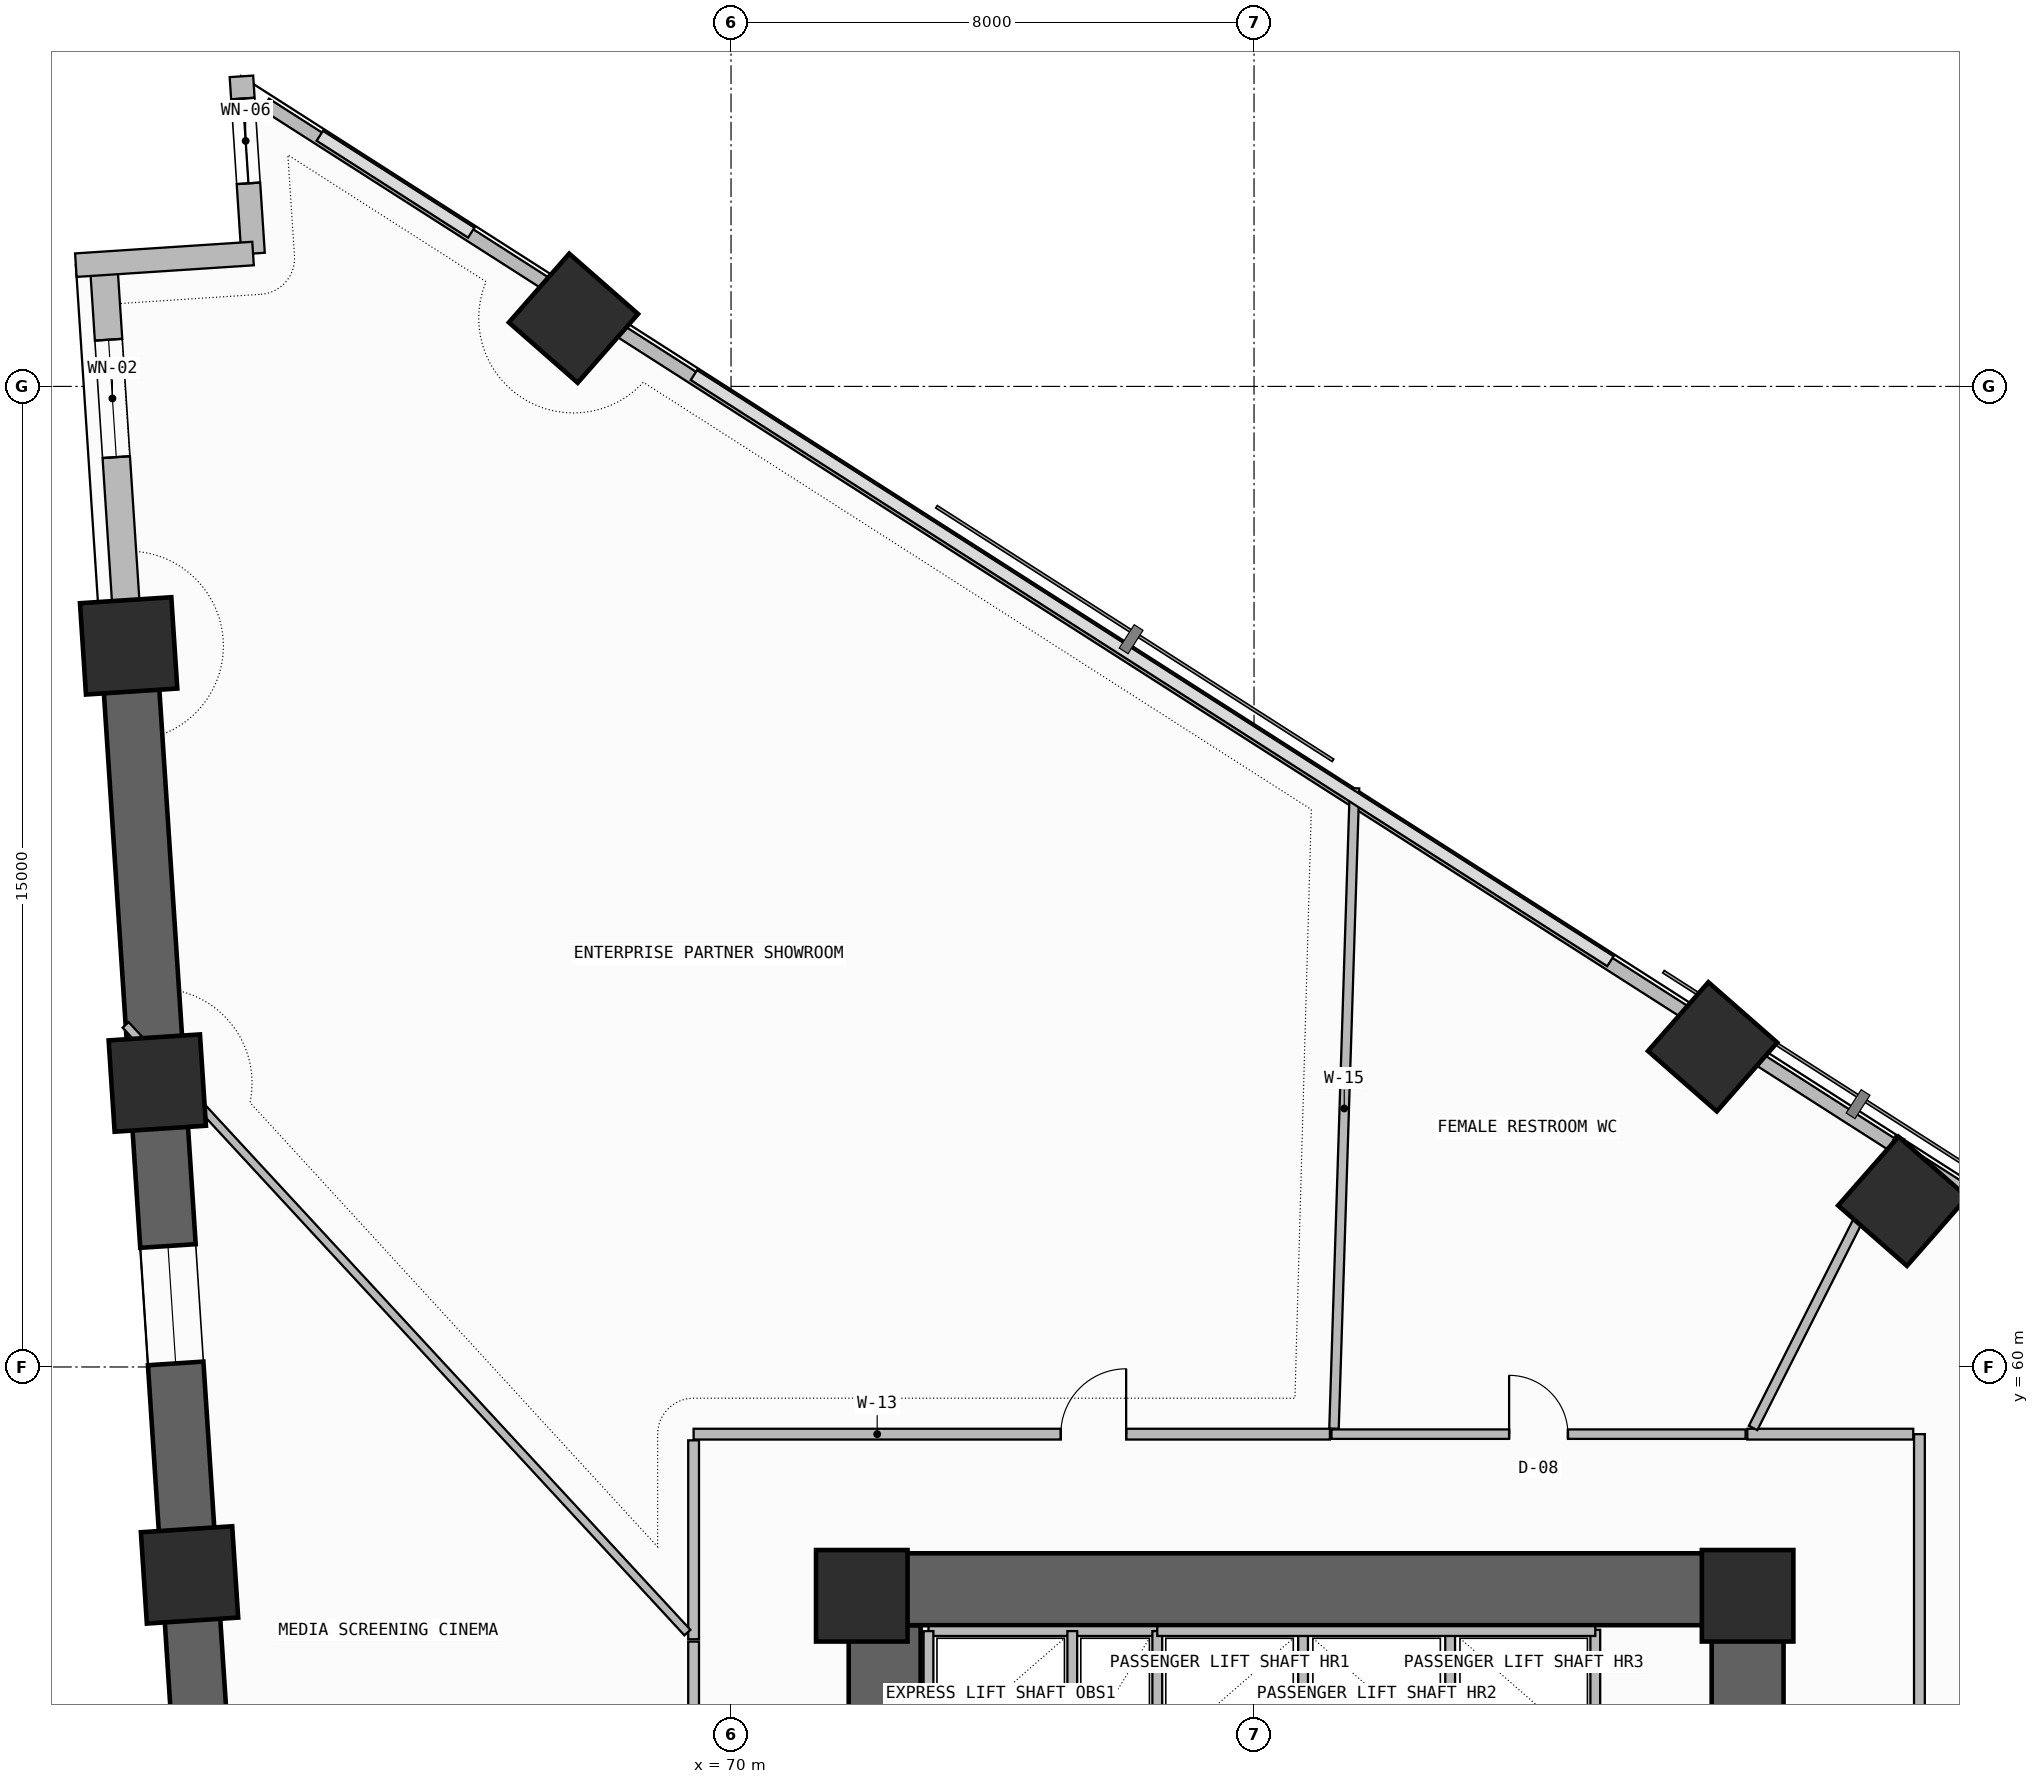
"""IFC4 building model, lengths in metres.
Left out: names, types, materials, properties, quantities, classifications, styles, units other than length and angle.
Written with IfcOpenShell. Run it as: python <this file> out.ifc"""

import sys

from ifc_helpers import new_model, si_unit, direction, frame, frame_2d, origin, origin_2d, place, context, subcontext, project, spatial, rectangle, extrude, element, fill, save


model = new_model("IFC4")
c1 = context("Model", 3, precision=1e-05, world=origin(), true_north=direction((0.0, 1.0)))
c2 = subcontext(c1, "Body", "Model", "MODEL_VIEW")
j1 = project(units=[si_unit("LENGTHUNIT", "METRE"), si_unit("PLANEANGLEUNIT", "RADIAN")], contexts=[c1])
p1 = place(None, origin())
s1 = spatial("IfcSite", under=j1, at=p1, CompositionType="ELEMENT")
p2 = place(p1, origin())
s2 = spatial("IfcBuilding", under=s1, at=p2, CompositionType="ELEMENT")
p3 = place(p2, frame((0.0, 0.0, 84.9)))
s3 = spatial("IfcBuildingStorey", under=s2, at=p3, CompositionType="ELEMENT", Elevation=84.9)
p4 = place(p3, frame((72.35, 43.35, -0.26), z_axis=(0.0, 0.0, 1.0), x_axis=(0.0, 1.0, 0.0)))
e1 = element("IfcWall", 1, at=p4, inside=s3, PredefinedType="SHEAR", context=c2, shape_type="SweptSolid", body=[
    extrude(rectangle(XDim=12.7, YDim=1.1, at=frame_2d((6.35, 0.0))), origin(), (0.0, 0.0, 1.0), 3.6),
])
p5 = place(p4, frame((1.35, 0.0, 0.26)))
e2 = element("IfcOpeningElement", 2, at=p5, cuts=e1, PredefinedType="OPENING", context=c2, shape_type="SweptSolid", body=[
    extrude(rectangle(XDim=1.2, YDim=2.2, at=frame_2d((0.6, 1.1))), frame((0.0, 0.56, 0.0), z_axis=(0.0, -1.0, 0.0), x_axis=(1.0, 0.0, 0.0)), (0.0, 0.0, 1.0), 1.12),
])
p6 = place(p3, frame((71.8, 56.6, -0.26), z_axis=(0.0, 0.0, 1.0), x_axis=(1.0, 0.0, 0.0)))
e3 = element("IfcWall", 3, at=p6, inside=s3, PredefinedType="SHEAR", context=c2, shape_type="SweptSolid", body=[
    extrude(rectangle(XDim=14.3, YDim=1.1, at=frame_2d((7.15, 0.0))), origin(), (0.0, 0.0, 1.0), 3.6),
])
p7 = place(p3, frame((85.55, 47.6, -0.26), z_axis=(0.0, 0.0, 1.0), x_axis=(0.0, 1.0, 0.0)))
e4 = element("IfcWall", 4, at=p7, inside=s3, PredefinedType="SHEAR", context=c2, shape_type="SweptSolid", body=[
    extrude(rectangle(XDim=8.45, YDim=1.1, at=frame_2d((4.225, 0.0))), origin(), (0.0, 0.0, 1.0), 3.6),
])
for number, where, z_axis, x_axis in (
    (5, (72.0, 56.5, 0.0), (0.0, 0.0, 1.0), (1.0, 0.0, 0.0)),
    (6, (85.55, 56.5, 0.0), (0.0, 0.0, 1.0), (1.0, 0.0, 0.0)),
    (7, (87.923, 62.534, 0.0), (0.0, 0.0, 1.0), (0.659, 0.752, 0.0)),
    (8, (85.015, 64.898, 0.0), (0.0, 0.0, 1.0), (0.659, 0.752, 0.0)),
    (9, (67.59, 76.043, 0.0), (0.0, 0.0, 1.0), (0.659, 0.752, 0.0)),
    (10, (60.785, 71.031, 0.0), (0.0, 0.0, 1.0), (-0.065, 0.998, 0.0)),
    (11, (61.224, 64.343, 0.0), (0.0, 0.0, 1.0), (-0.065, 0.998, 0.0)),
    (12, (61.717, 56.819, 0.0), (0.0, 0.0, 1.0), (-0.065, 0.998, 0.0)),
):
    element("IfcColumn", number, at=place(p3, frame(where, z_axis=z_axis, x_axis=x_axis)), inside=s3, PredefinedType="COLUMN", context=c2, shape_type="SweptSolid", body=[
        extrude(rectangle(XDim=1.4, YDim=1.4, at=origin_2d()), origin(), (0.0, 0.0, 1.0), 3.6),
    ])
p8 = place(p3, frame((60.402, 76.883, 0.0), z_axis=(0.0, 0.0, 1.0), x_axis=(0.065402662459, -0.997858953832, 0.0)))
e13 = element("IfcWall", 13, at=p8, inside=s3, PredefinedType="SOLIDWALL", context=c2, shape_type="SweptSolid", body=[
    extrude(rectangle(XDim=5.864, YDim=0.42, at=frame_2d((2.932, 0.0))), origin(), (0.0, 0.0, 1.0), 2.725),
])
p9 = place(p8, frame((1.171, 0.0, 1.2)))
e14 = element("IfcOpeningElement", 14, at=p9, cuts=e13, PredefinedType="OPENING", context=c2, shape_type="SweptSolid", body=[
    extrude(rectangle(XDim=1.8, YDim=0.9, at=frame_2d((0.9, 0.45))), frame((0.0, 0.22, 0.0), z_axis=(0.0, -1.0, 0.0), x_axis=(1.0, 0.0, 0.0)), (0.0, 0.0, 1.0), 0.44),
])
p10 = place(p3, frame((60.785, 71.031, -0.26), z_axis=(0.0, 0.0, 1.0), x_axis=(0.065409824833, -0.997858484363, 0.0)))
e15 = element("IfcWall", 15, at=p10, inside=s3, PredefinedType="SHEAR", context=c2, shape_type="SweptSolid", body=[
    extrude(rectangle(XDim=21.783, YDim=0.85, at=frame_2d((10.891, 0.0))), origin(), (0.0, 0.0, 1.0), 3.6),
])
p11 = place(p10, frame((9.2, 0.0, 1.2)))
e16 = element("IfcOpeningElement", 16, at=p11, cuts=e15, PredefinedType="OPENING", context=c2, shape_type="SweptSolid", body=[
    extrude(rectangle(XDim=1.8, YDim=0.9, at=frame_2d((0.9, 0.45))), frame((0.0, 0.435, 0.0), z_axis=(0.0, -1.0, 0.0), x_axis=(1.0, 0.0, 0.0)), (0.0, 0.0, 1.0), 0.87),
])
p12 = place(p3, frame((62.511, 79.743, 0.0), z_axis=(0.0, 0.0, 1.0), x_axis=(0.065337885661, -0.997863197386, 0.0)))
e17 = element("IfcWall", 17, at=p12, inside=s3, PredefinedType="SOLIDWALL", context=c2, shape_type="SweptSolid", body=[
    extrude(rectangle(XDim=2.717, YDim=0.36, at=frame_2d((1.358, 0.0))), origin(), (0.0, 0.0, 1.0), 3.34),
])
p13 = place(p12, frame((0.34, 0.0, 0.45)))
e18 = element("IfcOpeningElement", 18, at=p13, cuts=e17, PredefinedType="OPENING", context=c2, shape_type="SweptSolid", body=[
    extrude(rectangle(XDim=1.3, YDim=2.4, at=frame_2d((0.65, 1.2))), frame((0.0, 0.19, 0.0), z_axis=(0.0, -1.0, 0.0), x_axis=(1.0, 0.0, 0.0)), (0.0, 0.0, 1.0), 0.38),
])
p14 = place(p3, frame((62.688, 77.033, 0.0), z_axis=(0.0, 0.0, 1.0), x_axis=(-0.99785694905, -0.065433242561, 0.0)))
e19 = element("IfcWall", 19, at=p14, inside=s3, PredefinedType="SOLIDWALL", context=c2, shape_type="SweptSolid", body=[
    extrude(rectangle(XDim=2.716, YDim=0.36, at=frame_2d((1.358, 0.0))), origin(), (0.0, 0.0, 1.0), 3.34),
])
p15 = place(p3, frame((93.176, 59.939, 0.0), z_axis=(0.0, 0.0, 1.0), x_axis=(-0.842413081081, 0.538832256666, 0.0)))
e20 = element("IfcWall", 20, at=p15, inside=s3, PredefinedType="PARAPET", context=c2, shape_type="SweptSolid", body=[
    extrude(rectangle(XDim=9.011, YDim=0.2, at=frame_2d((4.505, 0.0))), origin(), (0.0, 0.0, 1.0), 1.15),
])
p16 = place(p3, frame((84.682, 65.372, 0.0), z_axis=(0.0, 0.0, 1.0), x_axis=(-0.842418773655, 0.538823356763, 0.0)))
e21 = element("IfcWall", 21, at=p16, inside=s3, PredefinedType="PARAPET", context=c2, shape_type="SweptSolid", body=[
    extrude(rectangle(XDim=19.612, YDim=0.2, at=frame_2d((9.806, 0.0))), origin(), (0.0, 0.0, 1.0), 1.15),
])
p17 = place(p3, frame((67.257, 76.518, 0.0), z_axis=(0.0, 0.0, 1.0), x_axis=(-0.842403631411, 0.538847030042, 0.0)))
e22 = element("IfcWall", 22, at=p17, inside=s3, PredefinedType="PARAPET", context=c2, shape_type="SweptSolid", body=[
    extrude(rectangle(XDim=5.196, YDim=0.2, at=frame_2d((2.598, 0.0))), origin(), (0.0, 0.0, 1.0), 1.15),
])
p18 = place(p3, frame((73.02, 55.96, 0.0), z_axis=(0.0, 0.0, 1.0), x_axis=(1.0, 0.0, 0.0)))
e23 = element("IfcWall", 23, at=p18, inside=s3, PredefinedType="SOLIDWALL", context=c2, shape_type="SweptSolid", body=[
    extrude(rectangle(XDim=3.5, YDim=0.15, at=frame_2d((1.75, 0.0))), origin(), (0.0, 0.0, 1.0), 3.34),
])
p19 = place(p3, frame((73.02, 54.02, 0.0), z_axis=(0.0, 0.0, 1.0), x_axis=(0.0, 1.0, 0.0)))
e24 = element("IfcWall", 24, at=p19, inside=s3, PredefinedType="PLUMBINGWALL", context=c2, shape_type="SweptSolid", body=[
    extrude(rectangle(XDim=1.94, YDim=0.15, at=frame_2d((0.97, 0.0))), origin(), (0.0, 0.0, 1.0), 3.34),
])
p20 = place(p3, frame((76.52, 54.02, 0.0), z_axis=(0.0, 0.0, 1.0), x_axis=(0.0, 1.0, 0.0)))
e25 = element("IfcWall", 25, at=p20, inside=s3, PredefinedType="SOLIDWALL", context=c2, shape_type="SweptSolid", body=[
    extrude(rectangle(XDim=1.94, YDim=0.15, at=frame_2d((0.97, 0.0))), origin(), (0.0, 0.0, 1.0), 3.34),
])
p21 = place(p3, frame((75.22, 54.02, 0.0), z_axis=(0.0, 0.0, 1.0), x_axis=(0.0, 1.0, 0.0)))
e26 = element("IfcWall", 26, at=p21, inside=s3, PredefinedType="PLUMBINGWALL", context=c2, shape_type="SweptSolid", body=[
    extrude(rectangle(XDim=1.94, YDim=0.15, at=frame_2d((0.97, 0.0))), origin(), (0.0, 0.0, 1.0), 3.34),
])
for number, where, z_axis, x_axis in (
    (27, (78.75, 54.02, 0.0), (0.0, 0.0, 1.0), (0.0, 1.0, 0.0)),
    (28, (81.0, 54.02, 0.0), (0.0, 0.0, 1.0), (0.0, 1.0, 0.0)),
):
    element("IfcWall", number, at=place(p3, frame(where, z_axis=z_axis, x_axis=x_axis)), inside=s3, PredefinedType="PLUMBINGWALL", context=c2, shape_type="SweptSolid", body=[
        extrude(rectangle(XDim=1.96, YDim=0.15, at=frame_2d((0.98, 0.0))), origin(), (0.0, 0.0, 1.0), 3.34),
    ])
p22 = place(p3, frame((83.22, 54.02, 0.0), z_axis=(0.0, 0.0, 1.0), x_axis=(0.0, 1.0, 0.0)))
e29 = element("IfcWall", 29, at=p22, inside=s3, PredefinedType="SOLIDWALL", context=c2, shape_type="SweptSolid", body=[
    extrude(rectangle(XDim=1.96, YDim=0.15, at=frame_2d((0.98, 0.0))), origin(), (0.0, 0.0, 1.0), 3.34),
])
p23 = place(p3, frame((76.52, 55.96, 0.0), z_axis=(0.0, 0.0, 1.0), x_axis=(1.0, 0.0, 0.0)))
e30 = element("IfcWall", 30, at=p23, inside=s3, PredefinedType="SOLIDWALL", context=c2, shape_type="SweptSolid", body=[
    extrude(rectangle(XDim=6.7, YDim=0.15, at=frame_2d((3.35, 0.0))), origin(), (0.0, 0.0, 1.0), 3.34),
])
p24 = place(p3, frame((88.178, 48.869, 0.0), z_axis=(0.0, 0.0, 1.0), x_axis=(0.0, 1.0, 0.0)))
e31 = element("IfcWall", 31, at=p24, inside=s3, PredefinedType="PARTITIONING", context=c2, shape_type="SweptSolid", body=[
    extrude(rectangle(XDim=10.103, YDim=0.165, at=frame_2d((5.052, 0.0))), origin(), (0.0, 0.0, 1.0), 2.725),
])
p25 = place(p24, frame((4.552, 0.0, 0.0)))
e32 = element("IfcOpeningElement", 32, at=p25, cuts=e31, PredefinedType="OPENING", context=c2, shape_type="SweptSolid", body=[
    extrude(rectangle(XDim=1.0, YDim=2.2, at=frame_2d((0.5, 1.1))), frame((0.0, 0.093, 0.0), z_axis=(0.0, -1.0, 0.0), x_axis=(1.0, 0.0, 0.0)), (0.0, 0.0, 1.0), 0.185),
])
p26 = place(p3, frame((88.083, 58.972, 0.0), z_axis=(0.0, 0.0, 1.0), x_axis=(-1.0, 0.0, 0.0)))
e33 = element("IfcWall", 33, at=p26, inside=s3, PredefinedType="PARTITIONING", context=c2, shape_type="SweptSolid", body=[
    extrude(rectangle(XDim=2.538, YDim=0.165, at=frame_2d((1.269, 0.0))), origin(), (0.0, 0.0, 1.0), 2.725),
])
p27 = place(p3, frame((85.634, 59.067, 0.0), z_axis=(0.0, 0.0, 1.0), x_axis=(0.451108601362, 0.892469063765, 0.0)))
e34 = element("IfcWall", 34, at=p27, inside=s3, PredefinedType="PARTITIONING", context=c2, shape_type="SweptSolid", body=[
    extrude(rectangle(XDim=4.984, YDim=0.145, at=frame_2d((2.492, 0.0))), origin(), (0.0, 0.0, 1.0), 2.725),
])
p28 = place(p3, frame((85.519, 58.972, 0.0), z_axis=(0.0, 0.0, 1.0), x_axis=(-1.0, 0.0, 0.0)))
e35 = element("IfcWall", 35, at=p28, inside=s3, PredefinedType="PARTITIONING", context=c2, shape_type="SweptSolid", body=[
    extrude(rectangle(XDim=6.334, YDim=0.145, at=frame_2d((3.167, 0.0))), origin(), (0.0, 0.0, 1.0), 2.725),
])
p29 = place(p28, frame((2.717, 0.0, 0.0)))
e36 = element("IfcOpeningElement", 36, at=p29, cuts=e35, PredefinedType="OPENING", context=c2, shape_type="SweptSolid", body=[
    extrude(rectangle(XDim=0.9, YDim=2.1, at=frame_2d((0.45, 1.05))), frame((0.0, 0.083, 0.0), z_axis=(0.0, -1.0, 0.0), x_axis=(1.0, 0.0, 0.0)), (0.0, 0.0, 1.0), 0.165),
])
p30 = place(p3, frame((79.223, 59.057, 0.0), z_axis=(0.0, 0.0, 1.0), x_axis=(0.032009309352, 0.999487570766, 0.0)))
e37 = element("IfcWall", 37, at=p30, inside=s3, PredefinedType="PARTITIONING", context=c2, shape_type="SweptSolid", body=[
    extrude(rectangle(XDim=9.801, YDim=0.145, at=frame_2d((4.9, 0.0))), origin(), (0.0, 0.0, 1.0), 2.875),
])
p31 = place(p3, frame((79.16, 58.972, 0.0), z_axis=(0.0, 0.0, 1.0), x_axis=(-1.0, 0.0, 0.0)))
e38 = element("IfcWall", 38, at=p31, inside=s3, PredefinedType="PARTITIONING", context=c2, shape_type="SweptSolid", body=[
    extrude(rectangle(XDim=9.733, YDim=0.165, at=frame_2d((4.866, 0.0))), origin(), (0.0, 0.0, 1.0), 2.725),
])
p32 = place(p31, frame((3.117, 0.0, 0.0)))
e39 = element("IfcOpeningElement", 39, at=p32, cuts=e38, PredefinedType="OPENING", context=c2, shape_type="SweptSolid", body=[
    extrude(rectangle(XDim=1.0, YDim=2.2, at=frame_2d((0.5, 1.1))), frame((0.0, 0.093, 0.0), z_axis=(0.0, -1.0, 0.0), x_axis=(1.0, 0.0, 0.0)), (0.0, 0.0, 1.0), 0.185),
])
p33 = place(p3, frame((69.427, 58.878, 0.0), z_axis=(0.0, 0.0, 1.0), x_axis=(0.0, -1.0, 0.0)))
e40 = element("IfcWall", 40, at=p33, inside=s3, PredefinedType="PARTITIONING", context=c2, shape_type="SweptSolid", body=[
    extrude(rectangle(XDim=3.043, YDim=0.165, at=frame_2d((1.521, 0.0))), origin(), (0.0, 0.0, 1.0), 2.725),
])
p34 = place(p3, frame((69.333, 55.937, 0.0), z_axis=(0.0, 0.0, 1.0), x_axis=(-0.678801357596, 0.73432194365, 0.0)))
e41 = element("IfcWall", 41, at=p34, inside=s3, PredefinedType="PARTITIONING", context=c2, shape_type="SweptSolid", body=[
    extrude(rectangle(XDim=12.66, YDim=0.125, at=frame_2d((6.33, 0.0))), origin(), (0.0, 0.0, 1.0), 2.325),
])
p35 = place(p3, frame((69.427, 55.799, 0.0), z_axis=(0.0, 0.0, 1.0), x_axis=(0.0, -1.0, 0.0)))
e42 = element("IfcWall", 42, at=p35, inside=s3, PredefinedType="PARTITIONING", context=c2, shape_type="SweptSolid", body=[
    extrude(rectangle(XDim=6.334, YDim=0.165, at=frame_2d((3.167, 0.0))), origin(), (0.0, 0.0, 1.0), 2.725),
])
p36 = place(p35, frame((1.927, 0.0, 0.0)))
e43 = element("IfcOpeningElement", 43, at=p36, cuts=e42, PredefinedType="OPENING", context=c2, shape_type="SweptSolid", body=[
    extrude(rectangle(XDim=1.0, YDim=2.2, at=frame_2d((0.5, 1.1))), frame((0.0, 0.093, 0.0), z_axis=(0.0, -1.0, 0.0), x_axis=(1.0, 0.0, 0.0)), (0.0, 0.0, 1.0), 0.185),
])
p37 = place(p9, origin())
e44 = element("IfcWindow", 44, at=p37, inside=s3, PartitioningType="SINGLE_PANEL", PredefinedType="WINDOW", context=c2, shape_type="SweptSolid", body=[
    extrude(rectangle(XDim=1.8, YDim=0.9, at=frame_2d((0.9, 0.45))), frame((0.0, 0.03, 0.0), z_axis=(0.0, -1.0, 0.0), x_axis=(1.0, 0.0, 0.0)), (0.0, 0.0, 1.0), 0.06),
])
fill(e14, e44)
p38 = place(p11, origin())
e45 = element("IfcWindow", 45, at=p38, inside=s3, PartitioningType="SINGLE_PANEL", PredefinedType="WINDOW", context=c2, shape_type="SweptSolid", body=[
    extrude(rectangle(XDim=1.8, YDim=0.9, at=frame_2d((0.9, 0.45))), frame((0.0, 0.03, 0.0), z_axis=(0.0, -1.0, 0.0), x_axis=(1.0, 0.0, 0.0)), (0.0, 0.0, 1.0), 0.06),
])
fill(e16, e45)
p39 = place(p13, origin())
e46 = element("IfcWindow", 46, at=p39, inside=s3, PartitioningType="SINGLE_PANEL", PredefinedType="WINDOW", context=c2, shape_type="SweptSolid", body=[
    extrude(rectangle(XDim=1.3, YDim=2.4, at=frame_2d((0.65, 1.2))), frame((0.0, 0.03, 0.0), z_axis=(0.0, -1.0, 0.0), x_axis=(1.0, 0.0, 0.0)), (0.0, 0.0, 1.0), 0.06),
])
fill(e18, e46)
p40 = place(p29, frame((0.9, 0.0, 0.0), z_axis=(0.0, 0.0, 1.0), x_axis=(-1.0, 0.0, 0.0)))
e47 = element("IfcDoor", 47, at=p40, inside=s3, OperationType="SINGLE_SWING_LEFT", PredefinedType="DOOR", context=c2, shape_type="SweptSolid", body=[
    extrude(rectangle(XDim=0.9, YDim=2.1, at=frame_2d((0.45, 1.05))), frame((0.0, 0.025, 0.0), z_axis=(0.0, -1.0, 0.0), x_axis=(1.0, 0.0, 0.0)), (0.0, 0.0, 1.0), 0.05),
])
fill(e36, e47)
p41 = place(p32, frame((1.0, 0.0, 0.0), z_axis=(0.0, 0.0, 1.0), x_axis=(-1.0, 0.0, 0.0)))
e48 = element("IfcDoor", 48, at=p41, inside=s3, OperationType="SINGLE_SWING_RIGHT", PredefinedType="DOOR", context=c2, shape_type="SweptSolid", body=[
    extrude(rectangle(XDim=1.0, YDim=2.2, at=frame_2d((0.5, 1.1))), frame((0.0, 0.025, 0.0), z_axis=(0.0, -1.0, 0.0), x_axis=(1.0, 0.0, 0.0)), (0.0, 0.0, 1.0), 0.05),
])
fill(e39, e48)
save(model, sys.argv[1])
